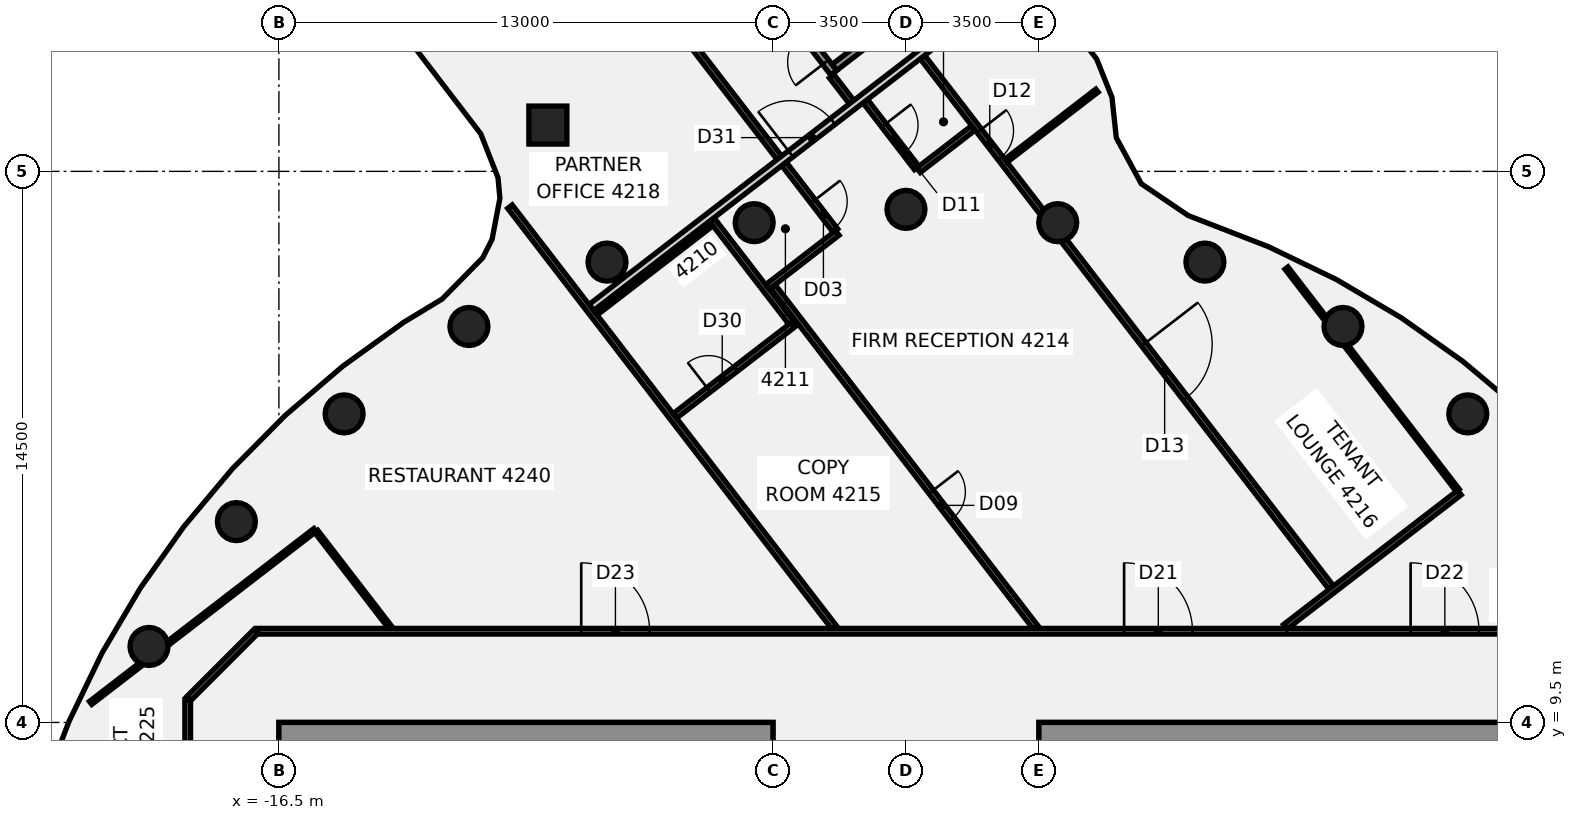
"""IFC4 building model, lengths in metres.
Left out: names, types, materials, properties, quantities, classifications, styles, units other than length and angle.
Written with IfcOpenShell. Run it as: python <this file> out.ifc"""

import sys

from ifc_helpers import new_model, si_unit, direction, frame, frame_2d, origin, origin_2d, place, context, subcontext, project, spatial, rectangle, circle, extrude, element, fill, save


model = new_model("IFC4")
c1 = context("Model", 3, precision=1e-05, world=origin(), true_north=direction((0.0, 1.0)))
c2 = subcontext(c1, "Body", "Model", "MODEL_VIEW")
j1 = project(units=[si_unit("LENGTHUNIT", "METRE"), si_unit("PLANEANGLEUNIT", "RADIAN")], contexts=[c1])
p1 = place(None, origin())
s1 = spatial("IfcSite", under=j1, at=p1, CompositionType="ELEMENT")
p2 = place(p1, origin())
s2 = spatial("IfcBuilding", under=s1, at=p2, CompositionType="ELEMENT")
p3 = place(p2, frame((0.0, 0.0, 170.5)))
s3 = spatial("IfcBuildingStorey", under=s2, at=p3, CompositionType="ELEMENT", Elevation=170.5)
for number, where, z_axis, x_axis in (
    (1, (14.784, 17.619, -0.14), (0.0, 0.0, 1.0), (1.0, 0.0, 0.0)),
    (2, (11.5, 19.919, -0.14), (0.0, 0.0, 1.0), (1.0, 0.0, 0.0)),
    (3, (7.866, 21.613, -0.14), (0.0, 0.0, 1.0), (1.0, 0.0, 0.0)),
    (4, (3.994, 22.651, -0.14), (0.0, 0.0, 1.0), (1.0, 0.0, 0.0)),
    (5, (0.0, 23.0, -0.14), (0.0, 0.0, 1.0), (1.0, 0.0, 0.0)),
    (6, (-3.994, 22.651, -0.14), (0.0, 0.0, 1.0), (1.0, 0.0, 0.0)),
    (7, (-7.866, 21.613, -0.14), (0.0, 0.0, 1.0), (1.0, 0.0, 0.0)),
    (8, (-11.5, 19.919, -0.14), (0.0, 0.0, 1.0), (1.0, 0.0, 0.0)),
    (9, (-14.784, 17.619, -0.14), (0.0, 0.0, 1.0), (1.0, 0.0, 0.0)),
    (10, (-17.619, 14.784, -0.14), (0.0, 0.0, 1.0), (1.0, 0.0, 0.0)),
    (11, (-19.919, 11.5, -0.14), (0.0, 0.0, 1.0), (1.0, 0.0, 0.0)),
):
    element("IfcColumn", number, at=place(p3, frame(where, z_axis=z_axis, x_axis=x_axis)), inside=s3, PredefinedType="COLUMN", context=c2, shape_type="SweptSolid", body=[
        extrude(circle(Radius=0.5, at=origin_2d()), origin(), (0.0, 0.0, 1.0), 3.75),
    ])
p4 = place(p3, frame((-9.423, 25.218, -0.139), z_axis=(-0.015162411435, -0.045877682669, 0.99883198763), x_axis=(0.791361600627, 0.610036224661, 0.04003275727)))
e12 = element("IfcColumn", 12, at=p4, inside=s3, PredefinedType="COLUMN", context=c2, shape_type="SweptSolid", body=[
    extrude(rectangle(XDim=1.0, YDim=1.0, at=origin_2d()), origin(), (0.0, 0.0, 1.0), 3.752),
])
p5 = place(p3, frame((-15.518, 14.525, 0.0), z_axis=(0.0, 0.0, 1.0), x_axis=(0.610299736782, -0.792170582188, 0.0)))
e13 = element("IfcWall", 13, at=p5, inside=s3, PredefinedType="PARTITIONING", context=c2, shape_type="SweptSolid", body=[
    extrude(rectangle(XDim=3.204, YDim=0.1, at=frame_2d((1.602, 0.0))), origin(), (0.0, 0.0, 1.0), 3.01),
])
p6 = place(p3, frame((-14.207, 38.474, 0.0), z_axis=(0.0, 0.0, 1.0), x_axis=(0.610299925341, -0.792170436919, 0.0)))
e14 = element("IfcWall", 14, at=p6, inside=s3, PredefinedType="PARTITIONING", context=c2, shape_type="SweptSolid", body=[
    extrude(rectangle(XDim=20.24, YDim=0.15, at=frame_2d((10.12, 0.0))), origin(), (0.0, 0.0, 1.0), 3.01),
])
p7 = place(p6, frame((19.27, 0.0, 0.0)))
e15 = element("IfcOpeningElement", 15, at=p7, cuts=e14, PredefinedType="OPENING", context=c2, shape_type="SweptSolid", body=[
    extrude(rectangle(XDim=0.9, YDim=2.1, at=frame_2d((0.45, 1.05))), frame((0.0, 0.085, 0.0), z_axis=(0.0, -1.0, 0.0), x_axis=(1.0, 0.0, 0.0)), (0.0, 0.0, 1.0), 0.17),
])
p8 = place(p6, frame((11.771, 0.0, 0.0)))
e16 = element("IfcOpeningElement", 16, at=p8, cuts=e14, PredefinedType="OPENING", context=c2, shape_type="SweptSolid", body=[
    extrude(rectangle(XDim=0.9, YDim=2.1, at=frame_2d((0.45, 1.05))), frame((0.0, 0.085, 0.0), z_axis=(0.0, -1.0, 0.0), x_axis=(1.0, 0.0, 0.0)), (0.0, 0.0, 1.0), 0.17),
])
p9 = place(p6, frame((5.17, 0.0, 0.0)))
e17 = element("IfcOpeningElement", 17, at=p9, cuts=e14, PredefinedType="OPENING", context=c2, shape_type="SweptSolid", body=[
    extrude(rectangle(XDim=0.9, YDim=2.1, at=frame_2d((0.45, 1.05))), frame((0.0, 0.085, 0.0), z_axis=(0.0, -1.0, 0.0), x_axis=(1.0, 0.0, 0.0)), (0.0, 0.0, 1.0), 0.17),
])
p10 = place(p3, frame((-1.954, 26.503, 0.0), z_axis=(0.0, 0.0, 1.0), x_axis=(0.610452149373, -0.792053137943, 0.0)))
e18 = element("IfcWall", 18, at=p10, inside=s3, PredefinedType="PARTITIONING", context=c2, shape_type="SweptSolid", body=[
    extrude(rectangle(XDim=0.859, YDim=0.15, at=frame_2d((0.43, 0.0))), origin(), (0.0, 0.0, 1.0), 3.01),
])
p11 = place(p3, frame((-10.42, 23.072, 0.0), z_axis=(0.0, 0.0, 1.0), x_axis=(0.61034802643, -0.792133376795, 0.0)))
e19 = element("IfcWall", 19, at=p11, inside=s3, PredefinedType="PARTITIONING", context=c2, shape_type="SweptSolid", body=[
    extrude(rectangle(XDim=13.974, YDim=0.15, at=frame_2d((6.987, 0.0))), origin(), (0.0, 0.0, 1.0), 3.01),
])
p12 = place(p3, frame((-5.11, 22.734, 0.0), z_axis=(0.0, 0.0, 1.0), x_axis=(0.610242883733, -0.792214379353, 0.0)))
e20 = element("IfcWall", 20, at=p12, inside=s3, PredefinedType="PARTITIONING", context=c2, shape_type="SweptSolid", body=[
    extrude(rectangle(XDim=3.48, YDim=0.15, at=frame_2d((1.74, 0.0))), origin(), (0.0, 0.0, 1.0), 3.01),
])
p13 = place(p3, frame((-3.499, 20.971, 0.0), z_axis=(0.0, 0.0, 1.0), x_axis=(0.610355666617, -0.792127489883, 0.0)))
e21 = element("IfcWall", 21, at=p13, inside=s3, PredefinedType="PARTITIONING", context=c2, shape_type="SweptSolid", body=[
    extrude(rectangle(XDim=11.321, YDim=0.15, at=frame_2d((5.661, 0.0))), origin(), (0.0, 0.0, 1.0), 3.01),
])
p14 = place(p13, frame((6.82, 0.0, 0.0)))
e22 = element("IfcOpeningElement", 22, at=p14, cuts=e21, PredefinedType="OPENING", context=c2, shape_type="SweptSolid", body=[
    extrude(rectangle(XDim=0.9, YDim=2.1, at=frame_2d((0.45, 1.05))), frame((0.0, 0.085, 0.0), z_axis=(0.0, -1.0, 0.0), x_axis=(1.0, 0.0, 0.0)), (0.0, 0.0, 1.0), 0.17),
])
p15 = place(p3, frame((-1.07, 25.847, 0.0), z_axis=(0.0, 0.0, 1.0), x_axis=(0.610211187745, -0.792238793768, 0.0)))
e23 = element("IfcWall", 23, at=p15, inside=s3, PredefinedType="PARTITIONING", context=c2, shape_type="SweptSolid", body=[
    extrude(rectangle(XDim=2.216, YDim=0.15, at=frame_2d((1.108, 0.0))), origin(), (0.0, 0.0, 1.0), 3.01),
])
p16 = place(p15, frame((0.8, 0.0, 0.0)))
e24 = element("IfcOpeningElement", 24, at=p16, cuts=e23, PredefinedType="OPENING", context=c2, shape_type="SweptSolid", body=[
    extrude(rectangle(XDim=0.9, YDim=2.1, at=frame_2d((0.45, 1.05))), frame((0.0, 0.085, 0.0), z_axis=(0.0, -1.0, 0.0), x_axis=(1.0, 0.0, 0.0)), (0.0, 0.0, 1.0), 0.17),
])
p17 = place(p3, frame((0.435, 27.006, 0.0), z_axis=(0.0, 0.0, 1.0), x_axis=(0.610430350369, -0.79206993842, 0.0)))
e25 = element("IfcWall", 25, at=p17, inside=s3, PredefinedType="PARTITIONING", context=c2, shape_type="SweptSolid", body=[
    extrude(rectangle(XDim=5.393, YDim=0.15, at=frame_2d((2.696, 0.0))), origin(), (0.0, 0.0, 1.0), 3.01),
])
p18 = place(p17, frame((2.45, 0.0, 0.0)))
e26 = element("IfcOpeningElement", 26, at=p18, cuts=e25, PredefinedType="OPENING", context=c2, shape_type="SweptSolid", body=[
    extrude(rectangle(XDim=0.9, YDim=2.1, at=frame_2d((0.45, 1.05))), frame((0.0, 0.085, 0.0), z_axis=(0.0, -1.0, 0.0), x_axis=(1.0, 0.0, 0.0)), (0.0, 0.0, 1.0), 0.17),
])
p19 = place(p3, frame((4.001, 22.378, 0.0), z_axis=(0.0, 0.0, 1.0), x_axis=(0.610409788395, -0.792085784642, 0.0)))
e27 = element("IfcWall", 27, at=p19, inside=s3, PredefinedType="PARTITIONING", context=c2, shape_type="SweptSolid", body=[
    extrude(rectangle(XDim=11.777, YDim=0.15, at=frame_2d((5.889, 0.0))), origin(), (0.0, 0.0, 1.0), 3.01),
])
p20 = place(p19, frame((3.696, 0.0, 0.0)))
e28 = element("IfcOpeningElement", 28, at=p20, cuts=e27, PredefinedType="OPENING", context=c2, shape_type="SweptSolid", body=[
    extrude(rectangle(XDim=1.8, YDim=2.1, at=frame_2d((0.9, 1.05))), frame((0.0, 0.085, 0.0), z_axis=(0.0, -1.0, 0.0), x_axis=(1.0, 0.0, 0.0)), (0.0, 0.0, 1.0), 0.17),
])
p21 = place(p3, frame((10.013, 21.456, 0.0), z_axis=(0.0, 0.0, 1.0), x_axis=(0.610360453682, -0.792123801297, 0.0)))
e29 = element("IfcWall", 29, at=p21, inside=s3, PredefinedType="PARTITIONING", context=c2, shape_type="SweptSolid", body=[
    extrude(rectangle(XDim=1.688, YDim=0.1, at=frame_2d((0.844, 0.0))), origin(), (0.0, 0.0, 1.0), 3.01),
])
p22 = place(p3, frame((11.575, 19.429, 0.0), z_axis=(0.0, 0.0, 1.0), x_axis=(0.610346471548, -0.792134574848, 0.0)))
e30 = element("IfcWall", 30, at=p22, inside=s3, PredefinedType="PARTITIONING", context=c2, shape_type="SweptSolid", body=[
    extrude(rectangle(XDim=4.824, YDim=0.1, at=frame_2d((2.412, 0.0))), origin(), (0.0, 0.0, 1.0), 3.01),
])
p23 = place(p3, frame((-17.065, 11.9, 0.0), z_axis=(0.0, 0.0, 1.0), x_axis=(1.0, 0.0, 0.0)))
e31 = element("IfcWall", 31, at=p23, inside=s3, PredefinedType="PARTITIONING", context=c2, shape_type="SweptSolid", body=[
    extrude(rectangle(XDim=34.165, YDim=0.15, at=frame_2d((17.083, 0.0))), origin(), (0.0, 0.0, 1.0), 3.01),
])
p24 = place(p23, frame((22.805, 0.0, 0.0)))
e32 = element("IfcOpeningElement", 32, at=p24, cuts=e31, PredefinedType="OPENING", context=c2, shape_type="SweptSolid", body=[
    extrude(rectangle(XDim=1.8, YDim=2.1, at=frame_2d((0.9, 1.05))), frame((0.0, 0.085, 0.0), z_axis=(0.0, -1.0, 0.0), x_axis=(1.0, 0.0, 0.0)), (0.0, 0.0, 1.0), 0.17),
])
p25 = place(p23, frame((30.345, 0.0, 0.0)))
e33 = element("IfcOpeningElement", 33, at=p25, cuts=e31, PredefinedType="OPENING", context=c2, shape_type="SweptSolid", body=[
    extrude(rectangle(XDim=1.8, YDim=2.1, at=frame_2d((0.9, 1.05))), frame((0.0, 0.085, 0.0), z_axis=(0.0, -1.0, 0.0), x_axis=(1.0, 0.0, 0.0)), (0.0, 0.0, 1.0), 0.17),
])
p26 = place(p23, frame((8.52, 0.0, 0.0)))
e34 = element("IfcOpeningElement", 34, at=p26, cuts=e31, PredefinedType="OPENING", context=c2, shape_type="SweptSolid", body=[
    extrude(rectangle(XDim=1.8, YDim=2.1, at=frame_2d((0.9, 1.05))), frame((0.0, 0.085, 0.0), z_axis=(0.0, -1.0, 0.0), x_axis=(1.0, 0.0, 0.0)), (0.0, 0.0, 1.0), 0.17),
])
p27 = place(p3, frame((-21.456, 10.013, 0.0), z_axis=(0.0, 0.0, 1.0), x_axis=(0.792123801297, 0.610360453682, 0.0)))
e35 = element("IfcWall", 35, at=p27, inside=s3, PredefinedType="PARTITIONING", context=c2, shape_type="SweptSolid", body=[
    extrude(rectangle(XDim=1.688, YDim=0.1, at=frame_2d((0.844, 0.0))), origin(), (0.0, 0.0, 1.0), 3.01),
])
p28 = place(p3, frame((-19.429, 11.575, 0.0), z_axis=(0.0, 0.0, 1.0), x_axis=(0.792140202804, 0.610339167269, 0.0)))
e36 = element("IfcWall", 36, at=p28, inside=s3, PredefinedType="PARTITIONING", context=c2, shape_type="SweptSolid", body=[
    extrude(rectangle(XDim=4.899, YDim=0.1, at=frame_2d((2.449, 0.0))), origin(), (0.0, 0.0, 1.0), 3.01),
])
p29 = place(p3, frame((-8.154, 20.262, 0.0), z_axis=(0.0, 0.0, 1.0), x_axis=(0.792123381053, 0.610360999073, 0.0)))
e37 = element("IfcWall", 37, at=p29, inside=s3, PredefinedType="PARTITIONING", context=c2, shape_type="SweptSolid", body=[
    extrude(rectangle(XDim=3.845, YDim=0.1, at=frame_2d((1.923, 0.0))), origin(), (0.0, 0.0, 1.0), 3.01),
])
p30 = place(p3, frame((-6.079, 17.569, 0.0), z_axis=(0.0, 0.0, 1.0), x_axis=(0.792128155669, 0.610354802551, 0.0)))
e38 = element("IfcWall", 38, at=p30, inside=s3, PredefinedType="PARTITIONING", context=c2, shape_type="SweptSolid", body=[
    extrude(rectangle(XDim=3.919, YDim=0.15, at=frame_2d((1.959, 0.0))), origin(), (0.0, 0.0, 1.0), 3.01),
])
p31 = place(p30, frame((1.12, 0.0, 0.0)))
e39 = element("IfcOpeningElement", 39, at=p31, cuts=e38, PredefinedType="OPENING", context=c2, shape_type="SweptSolid", body=[
    extrude(rectangle(XDim=0.9, YDim=2.1, at=frame_2d((0.45, 1.05))), frame((0.0, 0.085, 0.0), z_axis=(0.0, -1.0, 0.0), x_axis=(1.0, 0.0, 0.0)), (0.0, 0.0, 1.0), 0.17),
])
p32 = place(p3, frame((2.631, 24.28, 0.0), z_axis=(0.0, 0.0, 1.0), x_axis=(0.792134594795, 0.610346445659, 0.0)))
e40 = element("IfcWall", 40, at=p32, inside=s3, PredefinedType="PARTITIONING", context=c2, shape_type="SweptSolid", body=[
    extrude(rectangle(XDim=3.024, YDim=0.1, at=frame_2d((1.512, 0.0))), origin(), (0.0, 0.0, 1.0), 3.01),
])
p33 = place(p3, frame((-8.276, 20.42, 0.0), z_axis=(0.0, 0.0, 1.0), x_axis=(0.792091999987, 0.610401723095, 0.0)))
e41 = element("IfcWall", 41, at=p33, inside=s3, PredefinedType="PARTITIONING", context=c2, shape_type="SweptSolid", body=[
    extrude(rectangle(XDim=14.219, YDim=0.2, at=frame_2d((7.11, 0.0))), origin(), (0.0, 0.0, 1.0), 3.01),
])
p34 = place(p33, frame((6.62, 0.0, 0.0)))
e42 = element("IfcOpeningElement", 42, at=p34, cuts=e41, PredefinedType="OPENING", context=c2, shape_type="SweptSolid", body=[
    extrude(rectangle(XDim=1.4, YDim=2.1, at=frame_2d((0.7, 1.05))), frame((0.0, 0.11, 0.0), z_axis=(0.0, -1.0, 0.0), x_axis=(1.0, 0.0, 0.0)), (0.0, 0.0, 1.0), 0.22),
])
p35 = place(p3, frame((-3.643, 20.961, 0.0), z_axis=(0.0, 0.0, 1.0), x_axis=(0.791472426808, 0.611204873674, 0.0)))
e43 = element("IfcWall", 43, at=p35, inside=s3, PredefinedType="PARTITIONING", context=c2, shape_type="SweptSolid", body=[
    extrude(rectangle(XDim=2.32, YDim=0.15, at=frame_2d((1.16, 0.0))), origin(), (0.0, 0.0, 1.0), 3.01),
])
p36 = place(p3, frame((0.33, 24.029, 0.0), z_axis=(0.0, 0.0, 1.0), x_axis=(0.791535680407, 0.611122955421, 0.0)))
e44 = element("IfcWall", 44, at=p36, inside=s3, PredefinedType="PARTITIONING", context=c2, shape_type="SweptSolid", body=[
    extrude(rectangle(XDim=1.82, YDim=0.15, at=frame_2d((0.91, 0.0))), origin(), (0.0, 0.0, 1.0), 3.01),
])
p37 = place(p3, frame((9.98, 12.016, 0.0), z_axis=(0.0, 0.0, 1.0), x_axis=(0.792167406266, 0.610303859114, 0.0)))
e45 = element("IfcWall", 45, at=p37, inside=s3, PredefinedType="PARTITIONING", context=c2, shape_type="SweptSolid", body=[
    extrude(rectangle(XDim=5.787, YDim=0.15, at=frame_2d((2.894, 0.0))), origin(), (0.0, 0.0, 1.0), 3.01),
])
p38 = place(p3, frame((-18.872, 10.128, 0.0), z_axis=(0.0, 0.0, 1.0), x_axis=(0.707106781187, 0.707106781187, 0.0)))
e46 = element("IfcWall", 46, at=p38, inside=s3, PredefinedType="PARTITIONING", context=c2, shape_type="SweptSolid", body=[
    extrude(rectangle(XDim=2.505, YDim=0.15, at=frame_2d((1.253, 0.0))), origin(), (0.0, 0.0, 1.0), 3.01),
])
p39 = place(p3, frame((-18.9, -10.1, 0.0), z_axis=(0.0, 0.0, 1.0), x_axis=(0.0, 1.0, 0.0)))
e47 = element("IfcWall", 47, at=p39, inside=s3, PredefinedType="PARTITIONING", context=c2, shape_type="SweptSolid", body=[
    extrude(rectangle(XDim=20.2, YDim=0.15, at=frame_2d((10.1, 0.0))), origin(), (0.0, 0.0, 1.0), 3.01),
])
p40 = place(p39, frame((12.546, 0.0, 0.0)))
e48 = element("IfcOpeningElement", 48, at=p40, cuts=e47, PredefinedType="OPENING", context=c2, shape_type="SweptSolid", body=[
    extrude(rectangle(XDim=1.8, YDim=2.1, at=frame_2d((0.9, 1.05))), frame((0.0, 0.085, 0.0), z_axis=(0.0, -1.0, 0.0), x_axis=(1.0, 0.0, 0.0)), (0.0, 0.0, 1.0), 0.17),
])
p41 = place(p39, frame((4.394, 0.0, 0.0)))
e49 = element("IfcOpeningElement", 49, at=p41, cuts=e47, PredefinedType="OPENING", context=c2, shape_type="SweptSolid", body=[
    extrude(rectangle(XDim=0.9, YDim=2.1, at=frame_2d((0.45, 1.05))), frame((0.0, 0.085, 0.0), z_axis=(0.0, -1.0, 0.0), x_axis=(1.0, 0.0, 0.0)), (0.0, 0.0, 1.0), 0.17),
])
for number, where, z_axis, x_axis in (
    (50, (-16.5, 9.2, 0.0), (0.0, 0.0, 1.0), (1.0, 0.0, 0.0)),
    (51, (16.5, 9.2, 0.0), (0.0, 0.0, 1.0), (-1.0, 0.0, 0.0)),
):
    element("IfcWall", number, at=place(p3, frame(where, z_axis=z_axis, x_axis=x_axis)), inside=s3, PredefinedType="SHEAR", context=c2, shape_type="SweptSolid", body=[
        extrude(rectangle(XDim=13.0, YDim=0.6, at=frame_2d((6.5, 0.0))), origin(), (0.0, 0.0, 1.0), 3.61),
    ])
p42 = place(p3, frame((-1.9, 26.596, -0.14), z_axis=(0.0, 0.0, 1.0), x_axis=(-0.610326897316, 0.792149656576, 0.0)))
e52 = element("IfcWall", 52, at=p42, inside=s3, PredefinedType="SHEAR", context=c2, shape_type="SweptSolid", body=[
    extrude(rectangle(XDim=6.7, YDim=0.2, at=frame_2d((3.35, 0.0))), origin(), (0.0, 0.0, 1.0), 3.15),
])
p43 = place(p42, frame((0.35, 0.0, 0.0)))
e53 = element("IfcOpeningElement", 53, at=p43, cuts=e52, PredefinedType="OPENING", context=c2, shape_type="SweptSolid", body=[
    extrude(rectangle(XDim=1.0, YDim=2.1, at=frame_2d((0.5, 1.05))), frame((0.0, 0.11, 0.0), z_axis=(0.0, -1.0, 0.0), x_axis=(1.0, 0.0, 0.0)), (0.0, 0.0, 1.0), 0.22),
])
p44 = place(p3, frame((0.653, 28.689, -0.14), z_axis=(0.0, 0.0, 1.0), x_axis=(-0.792178482979, -0.610289481398, 0.0)))
e54 = element("IfcWall", 54, at=p44, inside=s3, PredefinedType="SHEAR", context=c2, shape_type="SweptSolid", body=[
    extrude(rectangle(XDim=3.2, YDim=0.2, at=frame_2d((1.6, 0.0))), origin(), (0.0, 0.0, 1.0), 3.15),
])
p45 = place(p7, frame((0.9, 0.0, 0.0), z_axis=(0.0, 0.0, 1.0), x_axis=(-1.0, 0.0, 0.0)))
e55 = element("IfcDoor", 55, at=p45, inside=s3, OperationType="SINGLE_SWING_RIGHT", PredefinedType="DOOR", context=c2, shape_type="SweptSolid", body=[
    extrude(rectangle(XDim=0.9, YDim=2.1, at=frame_2d((0.45, 1.05))), frame((0.0, 0.025, 0.0), z_axis=(0.0, -1.0, 0.0), x_axis=(1.0, 0.0, 0.0)), (0.0, 0.0, 1.0), 0.05),
])
fill(e15, e55)
p46 = place(p14, frame((0.9, 0.0, 0.0), z_axis=(0.0, 0.0, 1.0), x_axis=(-1.0, 0.0, 0.0)))
e56 = element("IfcDoor", 56, at=p46, inside=s3, OperationType="SINGLE_SWING_RIGHT", PredefinedType="DOOR", context=c2, shape_type="SweptSolid", body=[
    extrude(rectangle(XDim=0.9, YDim=2.1, at=frame_2d((0.45, 1.05))), frame((0.0, 0.025, 0.0), z_axis=(0.0, -1.0, 0.0), x_axis=(1.0, 0.0, 0.0)), (0.0, 0.0, 1.0), 0.05),
])
fill(e22, e56)
p47 = place(p16, origin())
e57 = element("IfcDoor", 57, at=p47, inside=s3, OperationType="SINGLE_SWING_LEFT", PredefinedType="DOOR", context=c2, shape_type="SweptSolid", body=[
    extrude(rectangle(XDim=0.9, YDim=2.1, at=frame_2d((0.45, 1.05))), frame((0.0, 0.025, 0.0), z_axis=(0.0, -1.0, 0.0), x_axis=(1.0, 0.0, 0.0)), (0.0, 0.0, 1.0), 0.05),
])
fill(e24, e57)
p48 = place(p18, origin())
e58 = element("IfcDoor", 58, at=p48, inside=s3, OperationType="SINGLE_SWING_LEFT", PredefinedType="DOOR", context=c2, shape_type="SweptSolid", body=[
    extrude(rectangle(XDim=0.9, YDim=2.1, at=frame_2d((0.45, 1.05))), frame((0.0, 0.025, 0.0), z_axis=(0.0, -1.0, 0.0), x_axis=(1.0, 0.0, 0.0)), (0.0, 0.0, 1.0), 0.05),
])
fill(e26, e58)
p49 = place(p20, origin())
e59 = element("IfcDoor", 59, at=p49, inside=s3, OperationType="DOUBLE_DOOR_SINGLE_SWING", PredefinedType="DOOR", context=c2, shape_type="SweptSolid", body=[
    extrude(rectangle(XDim=1.8, YDim=2.1, at=frame_2d((0.9, 1.05))), frame((0.0, 0.025, 0.0), z_axis=(0.0, -1.0, 0.0), x_axis=(1.0, 0.0, 0.0)), (0.0, 0.0, 1.0), 0.05),
])
fill(e28, e59)
p50 = place(p24, frame((1.8, 0.0, 0.0), z_axis=(0.0, 0.0, 1.0), x_axis=(-1.0, 0.0, 0.0)))
e60 = element("IfcDoor", 60, at=p50, inside=s3, OperationType="DOUBLE_DOOR_SINGLE_SWING", PredefinedType="DOOR", context=c2, shape_type="SweptSolid", body=[
    extrude(rectangle(XDim=1.8, YDim=2.1, at=frame_2d((0.9, 1.05))), frame((0.0, 0.025, 0.0), z_axis=(0.0, -1.0, 0.0), x_axis=(1.0, 0.0, 0.0)), (0.0, 0.0, 1.0), 0.05),
])
fill(e32, e60)
p51 = place(p25, origin())
e61 = element("IfcDoor", 61, at=p51, inside=s3, OperationType="DOUBLE_DOOR_SINGLE_SWING", PredefinedType="DOOR", context=c2, shape_type="SweptSolid", body=[
    extrude(rectangle(XDim=1.8, YDim=2.1, at=frame_2d((0.9, 1.05))), frame((0.0, 0.025, 0.0), z_axis=(0.0, -1.0, 0.0), x_axis=(1.0, 0.0, 0.0)), (0.0, 0.0, 1.0), 0.05),
])
fill(e33, e61)
p52 = place(p26, frame((1.8, 0.0, 0.0), z_axis=(0.0, 0.0, 1.0), x_axis=(-1.0, 0.0, 0.0)))
e62 = element("IfcDoor", 62, at=p52, inside=s3, OperationType="DOUBLE_DOOR_SINGLE_SWING", PredefinedType="DOOR", context=c2, shape_type="SweptSolid", body=[
    extrude(rectangle(XDim=1.8, YDim=2.1, at=frame_2d((0.9, 1.05))), frame((0.0, 0.025, 0.0), z_axis=(0.0, -1.0, 0.0), x_axis=(1.0, 0.0, 0.0)), (0.0, 0.0, 1.0), 0.05),
])
fill(e34, e62)
p53 = place(p31, origin())
e63 = element("IfcDoor", 63, at=p53, inside=s3, OperationType="SINGLE_SWING_RIGHT", PredefinedType="DOOR", context=c2, shape_type="SweptSolid", body=[
    extrude(rectangle(XDim=0.9, YDim=2.1, at=frame_2d((0.45, 1.05))), frame((0.0, 0.025, 0.0), z_axis=(0.0, -1.0, 0.0), x_axis=(1.0, 0.0, 0.0)), (0.0, 0.0, 1.0), 0.05),
])
fill(e39, e63)
p54 = place(p34, frame((1.4, 0.0, 0.0), z_axis=(0.0, 0.0, 1.0), x_axis=(-1.0, 0.0, 0.0)))
e64 = element("IfcDoor", 64, at=p54, inside=s3, OperationType="DOUBLE_DOOR_SINGLE_SWING", PredefinedType="DOOR", context=c2, shape_type="SweptSolid", body=[
    extrude(rectangle(XDim=1.4, YDim=2.1, at=frame_2d((0.7, 1.05))), frame((0.0, 0.025, 0.0), z_axis=(0.0, -1.0, 0.0), x_axis=(1.0, 0.0, 0.0)), (0.0, 0.0, 1.0), 0.05),
])
fill(e42, e64)
p55 = place(p43, origin())
e65 = element("IfcDoor", 65, at=p55, inside=s3, OperationType="SINGLE_SWING_LEFT", PredefinedType="DOOR", context=c2, shape_type="SweptSolid", body=[
    extrude(rectangle(XDim=1.0, YDim=2.1, at=frame_2d((0.5, 1.05))), frame((0.0, 0.025, 0.0), z_axis=(0.0, -1.0, 0.0), x_axis=(1.0, 0.0, 0.0)), (0.0, 0.0, 1.0), 0.05),
])
fill(e53, e65)
save(model, sys.argv[1])
